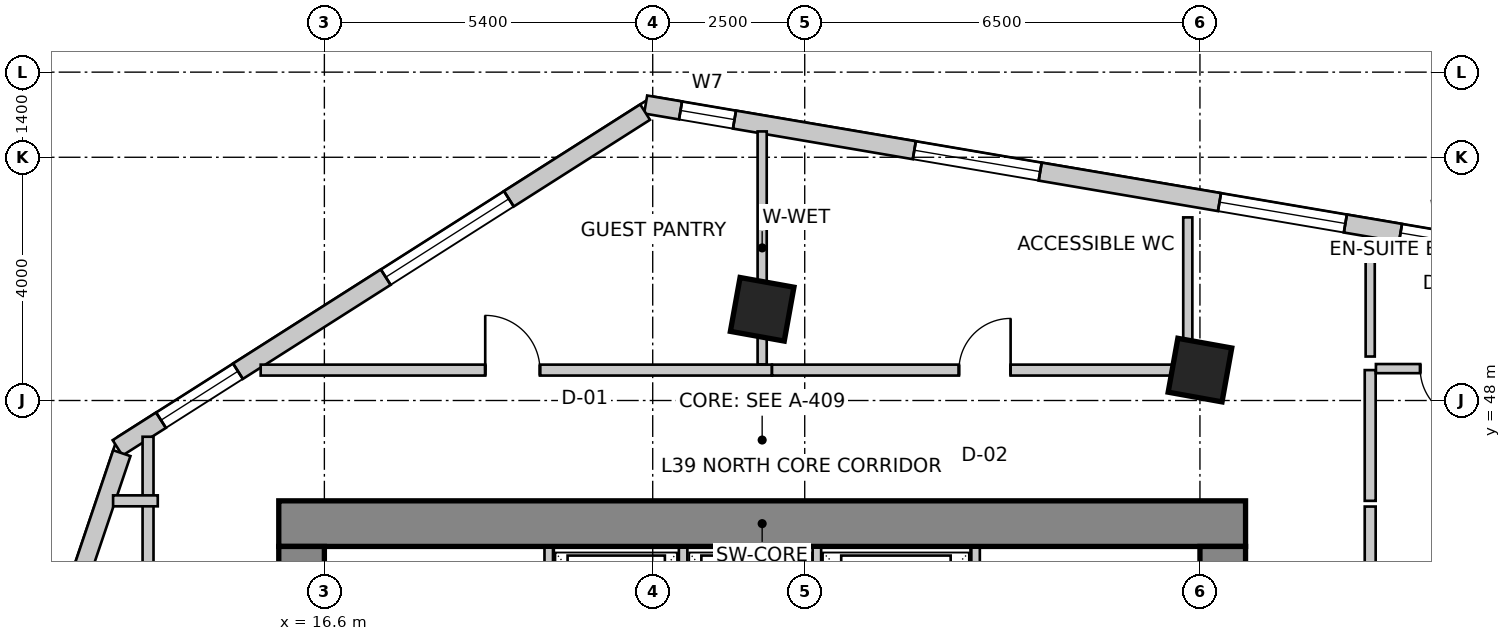
"""IFC4 building model, lengths in metres.
Left out: names, types, materials, properties, quantities, classifications, styles, units other than length and angle.
Written with IfcOpenShell. Run it as: python <this file> out.ifc"""

import sys

from ifc_helpers import new_model, si_unit, direction, frame, frame_2d, origin, origin_2d, place, context, subcontext, project, spatial, rectangle, extrude, source, transform, mapped, element, fill, save


model = new_model("IFC4")
c1 = context("Model", 3, precision=1e-05, world=origin(), true_north=direction((0.0, 1.0)))
c2 = subcontext(c1, "Body", "Model", "MODEL_VIEW")
j1 = project(units=[si_unit("LENGTHUNIT", "METRE"), si_unit("PLANEANGLEUNIT", "RADIAN")], contexts=[c1])
p1 = place(None, origin())
s1 = spatial("IfcSite", under=j1, at=p1, CompositionType="ELEMENT")
p2 = place(p1, origin())
s2 = spatial("IfcBuilding", under=s1, at=p2, CompositionType="ELEMENT")
p3 = place(p2, frame((0.0, 0.0, 157.4)))
s3 = spatial("IfcBuildingStorey", under=s2, at=p3, CompositionType="ELEMENT", Elevation=157.4)
p4 = place(p3, frame((15.85, 45.975, 0.0), z_axis=(0.0, 0.0, 1.0), x_axis=(1.0, 0.0, 0.0)))
e1 = element("IfcWall", 1, at=p4, inside=s3, PredefinedType="SHEAR", context=c2, shape_type="SweptSolid", body=[
    extrude(rectangle(XDim=15.9, YDim=0.75, at=frame_2d((7.95, 0.0))), origin(), (0.0, 0.0, 1.0), 3.6),
])
p5 = place(p3, frame((16.225, 34.2, 0.0), z_axis=(0.0, 0.0, 1.0), x_axis=(0.0, 1.0, 0.0)))
e2 = element("IfcWall", 2, at=p5, inside=s3, PredefinedType="SHEAR", context=c2, shape_type="SweptSolid", body=[
    extrude(rectangle(XDim=11.4, YDim=0.75, at=frame_2d((5.7, 0.0))), origin(), (0.0, 0.0, 1.0), 3.6),
])
m1 = source(origin(), c2, "Body", "SweptSolid", [
    extrude(rectangle(XDim=1.1, YDim=2.15, at=frame_2d((0.55, 1.075))), frame((0.0, 0.385, 0.0), z_axis=(0.0, -1.0, 0.0), x_axis=(1.0, 0.0, 0.0)), (0.0, 0.0, 1.0), 0.77),
])
p6 = place(p5, frame((7.15, 0.0, 0.0)))
e3 = element("IfcOpeningElement", 3, at=p6, cuts=e2, PredefinedType="OPENING", context=c2, shape_type="MappedRepresentation", body=[
    mapped(m1, transform((0.0, 0.0, 0.0), scale=1.0)),
])
p7 = place(p3, frame((31.375, 34.2, 0.0), z_axis=(0.0, 0.0, 1.0), x_axis=(0.0, 1.0, 0.0)))
e4 = element("IfcWall", 4, at=p7, inside=s3, PredefinedType="SHEAR", context=c2, shape_type="SweptSolid", body=[
    extrude(rectangle(XDim=11.4, YDim=0.75, at=frame_2d((5.7, 0.0))), origin(), (0.0, 0.0, 1.0), 3.6),
])
p8 = place(p7, frame((7.35, 0.0, 0.0)))
e5 = element("IfcOpeningElement", 5, at=p8, cuts=e4, PredefinedType="OPENING", context=c2, shape_type="MappedRepresentation", body=[
    mapped(m1, transform((0.0, 0.0, 0.0), scale=1.0)),
])
m2 = source(origin(), c2, "Body", "SweptSolid", [
    extrude(rectangle(XDim=0.9, YDim=0.9, at=origin_2d()), origin(), (0.0, 0.0, 1.0), 3.6),
])
for number, where, z_axis, x_axis in (
    (6, (23.8, 49.5, 0.0), (0.0, 0.0, 1.0), (0.984, -0.177, 0.0)),
    (7, (31.0, 48.5, 0.0), (0.0, 0.0, 1.0), (0.984, -0.177, 0.0)),
):
    element("IfcColumn", number, at=place(p3, frame(where, z_axis=z_axis, x_axis=x_axis)), inside=s3, PredefinedType="COLUMN", context=c2, shape_type="MappedRepresentation", body=[
        mapped(m2, transform((0.0, 0.0, 0.0), scale=1.0)),
    ])
p9 = place(p3, frame((53.561, 47.48, 0.0), z_axis=(0.0, 0.0, 1.0), x_axis=(-0.985845173895, 0.167658262868, 0.0)))
e8 = element("IfcWall", 8, at=p9, inside=s3, PredefinedType="SOLIDWALL", context=c2, shape_type="SweptSolid", body=[
    extrude(rectangle(XDim=32.132, YDim=0.3, at=frame_2d((16.066, 0.0))), origin(), (0.0, 0.0, 1.0), 3.35),
])
m3 = source(origin(), c2, "Body", "SweptSolid", [
    extrude(rectangle(XDim=2.1, YDim=2.0, at=frame_2d((1.05, 1.0))), frame((0.0, 0.16, 0.0), z_axis=(0.0, -1.0, 0.0), x_axis=(1.0, 0.0, 0.0)), (0.0, 0.0, 1.0), 0.32),
])
p10 = place(p9, frame((1.032, 0.0, 0.85)))
e9 = element("IfcOpeningElement", 9, at=p10, cuts=e8, PredefinedType="OPENING", context=c2, shape_type="MappedRepresentation", body=[
    mapped(m3, transform((0.0, 0.0, 0.0), scale=1.0)),
])
p11 = place(p9, frame((5.787, 0.0, 0.85)))
e10 = element("IfcOpeningElement", 10, at=p11, cuts=e8, PredefinedType="OPENING", context=c2, shape_type="MappedRepresentation", body=[
    mapped(m3, transform((0.0, 0.0, 0.0), scale=1.0)),
])
m4 = source(origin(), c2, "Body", "SweptSolid", [
    extrude(rectangle(XDim=1.5, YDim=1.8, at=frame_2d((0.75, 0.9))), frame((0.0, 0.16, 0.0), z_axis=(0.0, -1.0, 0.0), x_axis=(1.0, 0.0, 0.0)), (0.0, 0.0, 1.0), 0.32),
])
p12 = place(p9, frame((10.078, 0.0, 0.85)))
e11 = element("IfcOpeningElement", 11, at=p12, cuts=e8, PredefinedType="OPENING", context=c2, shape_type="MappedRepresentation", body=[
    mapped(m4, transform((0.0, 0.0, 0.0), scale=1.0)),
])
p13 = place(p9, frame((13.768, 0.0, 0.85)))
e12 = element("IfcOpeningElement", 12, at=p13, cuts=e8, PredefinedType="OPENING", context=c2, shape_type="MappedRepresentation", body=[
    mapped(m3, transform((0.0, 0.0, 0.0), scale=1.0)),
])
p14 = place(p9, frame((18.039, 0.0, 0.85)))
e13 = element("IfcOpeningElement", 13, at=p14, cuts=e8, PredefinedType="OPENING", context=c2, shape_type="MappedRepresentation", body=[
    mapped(m4, transform((0.0, 0.0, 0.0), scale=1.0)),
])
p15 = place(p9, frame((20.459, 0.0, 0.85)))
e14 = element("IfcOpeningElement", 14, at=p15, cuts=e8, PredefinedType="OPENING", context=c2, shape_type="MappedRepresentation", body=[
    mapped(m3, transform((0.0, 0.0, 0.0), scale=1.0)),
])
p16 = place(p9, frame((25.55, 0.0, 0.85)))
e15 = element("IfcOpeningElement", 15, at=p16, cuts=e8, PredefinedType="OPENING", context=c2, shape_type="MappedRepresentation", body=[
    mapped(m3, transform((0.0, 0.0, 0.0), scale=1.0)),
])
m5 = source(origin(), c2, "Body", "SweptSolid", [
    extrude(rectangle(XDim=0.9, YDim=1.6, at=frame_2d((0.45, 0.8))), frame((0.0, 0.16, 0.0), z_axis=(0.0, -1.0, 0.0), x_axis=(1.0, 0.0, 0.0)), (0.0, 0.0, 1.0), 0.32),
])
p17 = place(p9, frame((30.65, 0.0, 0.85)))
e16 = element("IfcOpeningElement", 16, at=p17, cuts=e8, PredefinedType="OPENING", context=c2, shape_type="MappedRepresentation", body=[
    mapped(m5, transform((0.0, 0.0, 0.0), scale=1.0)),
])
p18 = place(p3, frame((21.875, 52.742, 0.0), z_axis=(0.0, 0.0, 1.0), x_axis=(-0.843662465249, -0.536873956092, 0.0)))
e17 = element("IfcWall", 17, at=p18, inside=s3, PredefinedType="SOLIDWALL", context=c2, shape_type="SweptSolid", body=[
    extrude(rectangle(XDim=10.284, YDim=0.3, at=frame_2d((5.142, 0.0))), origin(), (0.0, 0.0, 1.0), 3.35),
])
m6 = source(origin(), c2, "Body", "SweptSolid", [
    extrude(rectangle(XDim=2.4, YDim=2.2, at=frame_2d((1.2, 1.1))), frame((0.0, 0.16, 0.0), z_axis=(0.0, -1.0, 0.0), x_axis=(1.0, 0.0, 0.0)), (0.0, 0.0, 1.0), 0.32),
])
p19 = place(p18, frame((2.656, 0.0, 0.85)))
e18 = element("IfcOpeningElement", 18, at=p19, cuts=e17, PredefinedType="OPENING", context=c2, shape_type="MappedRepresentation", body=[
    mapped(m6, transform((0.0, 0.0, 0.0), scale=1.0)),
])
p20 = place(p18, frame((7.937, 0.0, 0.85)))
e19 = element("IfcOpeningElement", 19, at=p20, cuts=e17, PredefinedType="OPENING", context=c2, shape_type="MappedRepresentation", body=[
    mapped(m4, transform((0.0, 0.0, 0.0), scale=1.0)),
])
p21 = place(p3, frame((13.269, 47.134, 0.0), z_axis=(0.0, 0.0, 1.0), x_axis=(-0.319929773322, -0.947441259468, 0.0)))
e20 = element("IfcWall", 20, at=p21, inside=s3, PredefinedType="SOLIDWALL", context=c2, shape_type="SweptSolid", body=[
    extrude(rectangle(XDim=16.134, YDim=0.3, at=frame_2d((8.067, 0.0))), origin(), (0.0, 0.0, 1.0), 3.35),
])
p22 = place(p21, frame((2.426, 0.0, 0.85)))
e21 = element("IfcOpeningElement", 21, at=p22, cuts=e20, PredefinedType="OPENING", context=c2, shape_type="MappedRepresentation", body=[
    mapped(m3, transform((0.0, 0.0, 0.0), scale=1.0)),
])
p23 = place(p21, frame((7.211, 0.0, 0.85)))
e22 = element("IfcOpeningElement", 22, at=p23, cuts=e20, PredefinedType="OPENING", context=c2, shape_type="MappedRepresentation", body=[
    mapped(m6, transform((0.0, 0.0, 0.0), scale=1.0)),
])
p24 = place(p21, frame((12.296, 0.0, 0.85)))
e23 = element("IfcOpeningElement", 23, at=p24, cuts=e20, PredefinedType="OPENING", context=c2, shape_type="MappedRepresentation", body=[
    mapped(m3, transform((0.0, 0.0, 0.0), scale=1.0)),
])
for number, where, z_axis, x_axis in (
    (24, (20.29, 43.28, 0.0), (0.0, 0.0, 1.0), (0.0, 1.0, 0.0)),
    (25, (27.31, 43.28, 0.0), (0.0, 0.0, 1.0), (0.0, 1.0, 0.0)),
):
    element("IfcWall", number, at=place(p3, frame(where, z_axis=z_axis, x_axis=x_axis)), inside=s3, PredefinedType="SOLIDWALL", context=c2, shape_type="SweptSolid", body=[
        extrude(rectangle(XDim=2.3, YDim=0.14, at=frame_2d((1.15, 0.0))), origin(), (0.0, 0.0, 1.0), 3.35),
    ])
for number, where, z_axis, x_axis in (
    (26, (22.5, 43.02, 0.0), (0.0, 0.0, 1.0), (0.0, 1.0, 0.0)),
    (27, (24.7, 43.02, 0.0), (0.0, 0.0, 1.0), (0.0, 1.0, 0.0)),
):
    element("IfcWall", number, at=place(p3, frame(where, z_axis=z_axis, x_axis=x_axis)), inside=s3, PredefinedType="SOLIDWALL", context=c2, shape_type="SweptSolid", body=[
        extrude(rectangle(XDim=2.56, YDim=0.14, at=frame_2d((1.28, 0.0))), origin(), (0.0, 0.0, 1.0), 3.35),
    ])
p25 = place(p3, frame((13.7, 33.544, 0.0), z_axis=(0.0, 0.0, 1.0), x_axis=(0.0, 1.0, 0.0)))
e28 = element("IfcWall", 28, at=p25, inside=s3, PredefinedType="PARTITIONING", context=c2, shape_type="SweptSolid", body=[
    extrude(rectangle(XDim=13.86, YDim=0.18, at=frame_2d((6.93, 0.0))), origin(), (0.0, 0.0, 1.0), 2.492),
])
m7 = source(origin(), c2, "Body", "SweptSolid", [
    extrude(rectangle(XDim=0.9, YDim=2.15, at=frame_2d((0.45, 1.075))), frame((0.0, 0.1, 0.0), z_axis=(0.0, -1.0, 0.0), x_axis=(1.0, 0.0, 0.0)), (0.0, 0.0, 1.0), 0.2),
])
p26 = place(p25, frame((4.253, 0.0, 0.0)))
e29 = element("IfcOpeningElement", 29, at=p26, cuts=e28, PredefinedType="OPENING", context=c2, shape_type="MappedRepresentation", body=[
    mapped(m7, transform((0.0, 0.0, 0.0), scale=1.0)),
])
p27 = place(p3, frame((13.86, 46.35, 0.0), z_axis=(0.0, 0.0, 1.0), x_axis=(-1.0, 0.0, 0.0)))
e30 = element("IfcWall", 30, at=p27, inside=s3, PredefinedType="PARTITIONING", context=c2, shape_type="SweptSolid", body=[
    extrude(rectangle(XDim=0.735, YDim=0.18, at=frame_2d((0.367, 0.0))), origin(), (0.0, 0.0, 1.0), 3.35),
])
p28 = place(p3, frame((15.552, 48.5, 0.0), z_axis=(0.0, 0.0, 1.0), x_axis=(1.0, 0.0, 0.0)))
e31 = element("IfcWall", 31, at=p28, inside=s3, PredefinedType="PARTITIONING", context=c2, shape_type="SweptSolid", body=[
    extrude(rectangle(XDim=8.407, YDim=0.18, at=frame_2d((4.204, 0.0))), origin(), (0.0, 0.0, 1.0), 2.935),
])
p29 = place(p28, frame((3.693, 0.0, 0.0)))
e32 = element("IfcOpeningElement", 32, at=p29, cuts=e31, PredefinedType="OPENING", context=c2, shape_type="MappedRepresentation", body=[
    mapped(m7, transform((0.0, 0.0, 0.0), scale=1.0)),
])
p30 = place(p3, frame((23.962, 48.5, 0.0), z_axis=(0.0, 0.0, 1.0), x_axis=(1.0, 0.0, 0.0)))
e33 = element("IfcWall", 33, at=p30, inside=s3, PredefinedType="PARTITIONING", context=c2, shape_type="SweptSolid", body=[
    extrude(rectangle(XDim=6.998, YDim=0.18, at=frame_2d((3.499, 0.0))), origin(), (0.0, 0.0, 1.0), 2.492),
])
m8 = source(origin(), c2, "Body", "SweptSolid", [
    extrude(rectangle(XDim=0.85, YDim=2.15, at=frame_2d((0.425, 1.075))), frame((0.0, 0.1, 0.0), z_axis=(0.0, -1.0, 0.0), x_axis=(1.0, 0.0, 0.0)), (0.0, 0.0, 1.0), 0.2),
])
p31 = place(p30, frame((3.074, 0.0, 0.0)))
e34 = element("IfcOpeningElement", 34, at=p31, cuts=e33, PredefinedType="OPENING", context=c2, shape_type="MappedRepresentation", body=[
    mapped(m8, transform((0.0, 0.0, 0.0), scale=1.0)),
])
p32 = place(p3, frame((33.8, 48.5, 0.0), z_axis=(0.0, 0.0, 1.0), x_axis=(0.0, -1.0, 0.0)))
e35 = element("IfcWall", 35, at=p32, inside=s3, PredefinedType="PARTITIONING", context=c2, shape_type="SweptSolid", body=[
    extrude(rectangle(XDim=2.15, YDim=0.18, at=frame_2d((1.075, 0.0))), origin(), (0.0, 0.0, 1.0), 2.492),
])
p33 = place(p3, frame((33.8, 46.256, 0.0), z_axis=(0.0, 0.0, 1.0), x_axis=(0.0, -1.0, 0.0)))
e36 = element("IfcWall", 36, at=p33, inside=s3, PredefinedType="PARTITIONING", context=c2, shape_type="SweptSolid", body=[
    extrude(rectangle(XDim=4.016, YDim=0.18, at=frame_2d((2.008, 0.0))), origin(), (0.0, 0.0, 1.0), 2.788),
])
p34 = place(p3, frame((23.8, 52.425, 0.0), z_axis=(0.0, 0.0, 1.0), x_axis=(0.0, -1.0, 0.0)))
e37 = element("IfcWall", 37, at=p34, inside=s3, PredefinedType="PARTITIONING", context=c2, shape_type="SweptSolid", body=[
    extrude(rectangle(XDim=3.831, YDim=0.15, at=frame_2d((1.916, 0.0))), origin(), (0.0, 0.0, 1.0), 2.492),
])
p35 = place(p3, frame((36.2, 48.524, 0.0), z_axis=(0.0, 0.0, 1.0), x_axis=(-1.0, 0.0, 0.0)))
e38 = element("IfcWall", 38, at=p35, inside=s3, PredefinedType="PARTITIONING", context=c2, shape_type="SweptSolid", body=[
    extrude(rectangle(XDim=2.306, YDim=0.15, at=frame_2d((1.153, 0.0))), origin(), (0.0, 0.0, 1.0), 3.35),
])
m9 = source(origin(), c2, "Body", "SweptSolid", [
    extrude(rectangle(XDim=0.85, YDim=2.15, at=frame_2d((0.425, 1.075))), frame((0.0, 0.085, 0.0), z_axis=(0.0, -1.0, 0.0), x_axis=(1.0, 0.0, 0.0)), (0.0, 0.0, 1.0), 0.17),
])
p36 = place(p35, frame((0.728, 0.0, 0.0)))
e39 = element("IfcOpeningElement", 39, at=p36, cuts=e38, PredefinedType="OPENING", context=c2, shape_type="MappedRepresentation", body=[
    mapped(m9, transform((0.0, 0.0, 0.0), scale=1.0)),
])
p37 = place(p3, frame((30.8, 51.011, 0.0), z_axis=(0.0, 0.0, 1.0), x_axis=(0.0, -1.0, 0.0)))
e40 = element("IfcWall", 40, at=p37, inside=s3, PredefinedType="PARTITIONING", context=c2, shape_type="SweptSolid", body=[
    extrude(rectangle(XDim=2.292, YDim=0.15, at=frame_2d((1.146, 0.0))), origin(), (0.0, 0.0, 1.0), 3.35),
])
p38 = place(p3, frame((33.8, 48.723, 0.0), z_axis=(0.0, 0.0, 1.0), x_axis=(0.0, 1.0, 0.0)))
e41 = element("IfcWall", 41, at=p38, inside=s3, PredefinedType="PARTITIONING", context=c2, shape_type="SweptSolid", body=[
    extrude(rectangle(XDim=1.778, YDim=0.15, at=frame_2d((0.889, 0.0))), origin(), (0.0, 0.0, 1.0), 3.35),
])
m10 = source(origin(), c2, "Body", "SweptSolid", [
    extrude(rectangle(XDim=1.5, YDim=1.8, at=frame_2d((0.75, 0.9))), frame((0.0, -0.015, 0.0), z_axis=(0.0, -1.0, 0.0), x_axis=(1.0, 0.0, 0.0)), (0.0, 0.0, 1.0), 0.06),
])
p39 = place(p14, origin())
e42 = element("IfcWindow", 42, at=p39, inside=s3, PartitioningType="SINGLE_PANEL", PredefinedType="WINDOW", context=c2, shape_type="MappedRepresentation", body=[
    mapped(m10, transform((0.0, 0.0, 0.0), scale=1.0)),
])
fill(e13, e42)
m11 = source(origin(), c2, "Body", "SweptSolid", [
    extrude(rectangle(XDim=2.1, YDim=2.0, at=frame_2d((1.05, 1.0))), frame((0.0, -0.015, 0.0), z_axis=(0.0, -1.0, 0.0), x_axis=(1.0, 0.0, 0.0)), (0.0, 0.0, 1.0), 0.06),
])
p40 = place(p15, origin())
e43 = element("IfcWindow", 43, at=p40, inside=s3, PartitioningType="SINGLE_PANEL", PredefinedType="WINDOW", context=c2, shape_type="MappedRepresentation", body=[
    mapped(m11, transform((0.0, 0.0, 0.0), scale=1.0)),
])
fill(e14, e43)
p41 = place(p16, origin())
e44 = element("IfcWindow", 44, at=p41, inside=s3, PartitioningType="SINGLE_PANEL", PredefinedType="WINDOW", context=c2, shape_type="MappedRepresentation", body=[
    mapped(m11, transform((0.0, 0.0, 0.0), scale=1.0)),
])
fill(e15, e44)
m12 = source(origin(), c2, "Body", "SweptSolid", [
    extrude(rectangle(XDim=0.9, YDim=1.6, at=frame_2d((0.45, 0.8))), frame((0.0, -0.015, 0.0), z_axis=(0.0, -1.0, 0.0), x_axis=(1.0, 0.0, 0.0)), (0.0, 0.0, 1.0), 0.06),
])
p42 = place(p17, origin())
e45 = element("IfcWindow", 45, at=p42, inside=s3, PartitioningType="SINGLE_PANEL", PredefinedType="WINDOW", context=c2, shape_type="MappedRepresentation", body=[
    mapped(m12, transform((0.0, 0.0, 0.0), scale=1.0)),
])
fill(e16, e45)
m13 = source(origin(), c2, "Body", "SweptSolid", [
    extrude(rectangle(XDim=2.4, YDim=2.2, at=frame_2d((1.2, 1.1))), frame((0.0, -0.015, 0.0), z_axis=(0.0, -1.0, 0.0), x_axis=(1.0, 0.0, 0.0)), (0.0, 0.0, 1.0), 0.06),
])
p43 = place(p19, origin())
e46 = element("IfcWindow", 46, at=p43, inside=s3, PartitioningType="SINGLE_PANEL", PredefinedType="WINDOW", context=c2, shape_type="MappedRepresentation", body=[
    mapped(m13, transform((0.0, 0.0, 0.0), scale=1.0)),
])
fill(e18, e46)
p44 = place(p20, origin())
e47 = element("IfcWindow", 47, at=p44, inside=s3, PartitioningType="SINGLE_PANEL", PredefinedType="WINDOW", context=c2, shape_type="MappedRepresentation", body=[
    mapped(m10, transform((0.0, 0.0, 0.0), scale=1.0)),
])
fill(e19, e47)
m14 = source(origin(), c2, "Body", "SweptSolid", [
    extrude(rectangle(XDim=0.9, YDim=2.15, at=frame_2d((0.45, 1.075))), frame((0.0, 0.025, 0.0), z_axis=(0.0, -1.0, 0.0), x_axis=(1.0, 0.0, 0.0)), (0.0, 0.0, 1.0), 0.05),
])
p45 = place(p29, origin())
e48 = element("IfcDoor", 48, at=p45, inside=s3, OperationType="SINGLE_SWING_LEFT", PredefinedType="DOOR", context=c2, shape_type="MappedRepresentation", body=[
    mapped(m14, transform((0.0, 0.0, 0.0), scale=1.0)),
])
fill(e32, e48)
m15 = source(origin(), c2, "Body", "SweptSolid", [
    extrude(rectangle(XDim=0.85, YDim=2.15, at=frame_2d((0.425, 1.075))), frame((0.0, 0.025, 0.0), z_axis=(0.0, -1.0, 0.0), x_axis=(1.0, 0.0, 0.0)), (0.0, 0.0, 1.0), 0.05),
])
p46 = place(p31, origin())
e49 = element("IfcDoor", 49, at=p46, inside=s3, OperationType="SINGLE_SWING_RIGHT", PredefinedType="DOOR", context=c2, shape_type="MappedRepresentation", body=[
    mapped(m15, transform((0.0, 0.0, 0.0), scale=1.0)),
])
fill(e34, e49)
p47 = place(p36, origin())
e50 = element("IfcDoor", 50, at=p47, inside=s3, OperationType="SINGLE_SWING_LEFT", PredefinedType="DOOR", context=c2, shape_type="MappedRepresentation", body=[
    mapped(m15, transform((0.0, 0.0, 0.0), scale=1.0)),
])
fill(e39, e50)
save(model, sys.argv[1])
